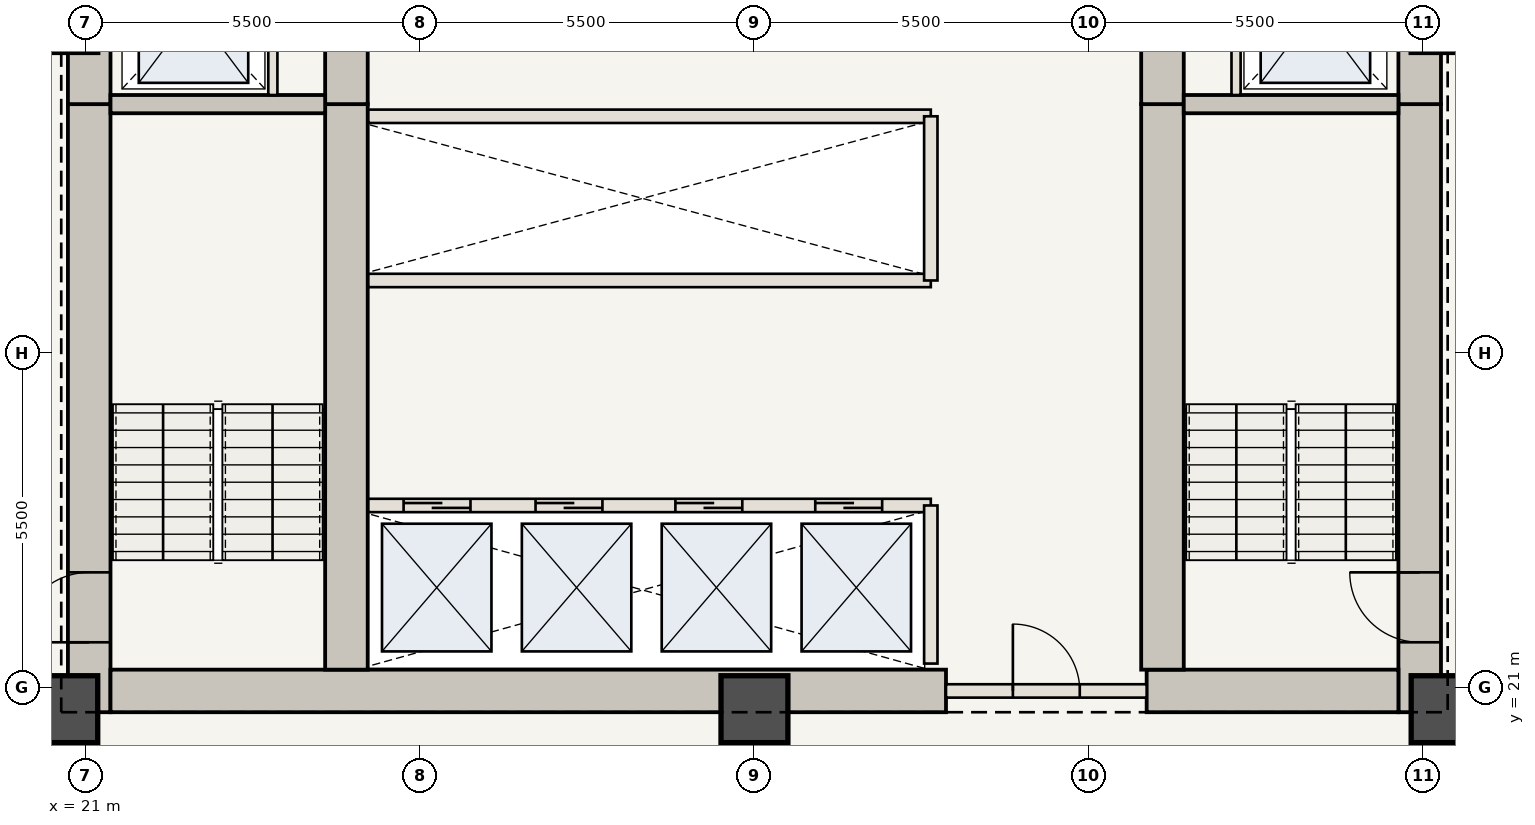
"""IFC4 building model, lengths in metres.
Left out: names, types, materials, properties, quantities, classifications, styles, units other than length and angle.
Written with IfcOpenShell. Run it as: python <this file> out.ifc"""

import sys

from ifc_helpers import new_model, si_unit, direction, frame, frame_2d, origin, origin_2d, place, context, subcontext, project, spatial, rectangle, extrude, element, fill, save


model = new_model("IFC4")
c1 = context("Model", 3, precision=1e-05, world=origin(), true_north=direction((0.0, 1.0)))
c2 = subcontext(c1, "Body", "Model", "MODEL_VIEW")
j1 = project(units=[si_unit("LENGTHUNIT", "METRE"), si_unit("PLANEANGLEUNIT", "RADIAN")], contexts=[c1])
p1 = place(None, origin())
s1 = spatial("IfcSite", under=j1, at=p1, CompositionType="ELEMENT")
p2 = place(p1, origin())
s2 = spatial("IfcBuilding", under=s1, at=p2, CompositionType="ELEMENT")
p3 = place(p2, frame((0.0, 0.0, 52.85)))
s3 = spatial("IfcBuildingStorey", under=s2, at=p3, CompositionType="ELEMENT", Elevation=52.85)
p4 = place(p3, frame((21.06, 20.6, 0.0), z_axis=(0.0, 0.0, 1.0), x_axis=(0.0, 1.0, 0.0)))
e1 = element("IfcWall", 1, at=p4, inside=s3, PredefinedType="SHEAR", context=c2, shape_type="SweptSolid", body=[
    extrude(rectangle(XDim=10.0, YDim=0.7, at=frame_2d((5.0, 0.0))), origin(), (0.0, 0.0, 1.0), 3.5),
])
p5 = place(p4, frame((1.15, 0.0, 0.0)))
e2 = element("IfcOpeningElement", 2, at=p5, cuts=e1, PredefinedType="OPENING", context=c2, shape_type="SweptSolid", body=[
    extrude(rectangle(XDim=1.15, YDim=2.15, at=frame_2d((0.575, 1.075))), frame((0.0, 0.36, 0.0), z_axis=(0.0, -1.0, 0.0), x_axis=(1.0, 0.0, 0.0)), (0.0, 0.0, 1.0), 0.72),
])
p6 = place(p3, frame((21.06, 30.6, 0.0), z_axis=(0.0, 0.0, 1.0), x_axis=(0.0, 1.0, 0.0)))
e3 = element("IfcWall", 3, at=p6, inside=s3, PredefinedType="SHEAR", context=c2, shape_type="SweptSolid", body=[
    extrude(rectangle(XDim=12.75, YDim=0.7, at=frame_2d((6.375, 0.0))), origin(), (0.0, 0.0, 1.0), 3.5),
])
p7 = place(p6, frame((4.2, 0.0, 0.0)))
e4 = element("IfcOpeningElement", 4, at=p7, cuts=e3, PredefinedType="OPENING", context=c2, shape_type="SweptSolid", body=[
    extrude(rectangle(XDim=1.1, YDim=2.15, at=frame_2d((0.55, 1.075))), frame((0.0, 0.36, 0.0), z_axis=(0.0, -1.0, 0.0), x_axis=(1.0, 0.0, 0.0)), (0.0, 0.0, 1.0), 0.72),
])
p8 = place(p6, frame((9.2, 0.0, 0.0)))
e5 = element("IfcOpeningElement", 5, at=p8, cuts=e3, PredefinedType="OPENING", context=c2, shape_type="SweptSolid", body=[
    extrude(rectangle(XDim=0.92, YDim=2.1, at=frame_2d((0.46, 1.05))), frame((0.0, 0.36, 0.0), z_axis=(0.0, -1.0, 0.0), x_axis=(1.0, 0.0, 0.0)), (0.0, 0.0, 1.0), 0.72),
])
p9 = place(p3, frame((42.94, 20.6, 0.0), z_axis=(0.0, 0.0, 1.0), x_axis=(0.0, 1.0, 0.0)))
e6 = element("IfcWall", 6, at=p9, inside=s3, PredefinedType="SHEAR", context=c2, shape_type="SweptSolid", body=[
    extrude(rectangle(XDim=10.0, YDim=0.7, at=frame_2d((5.0, 0.0))), origin(), (0.0, 0.0, 1.0), 3.5),
])
p10 = place(p9, frame((1.15, 0.0, 0.0)))
e7 = element("IfcOpeningElement", 7, at=p10, cuts=e6, PredefinedType="OPENING", context=c2, shape_type="SweptSolid", body=[
    extrude(rectangle(XDim=1.15, YDim=2.15, at=frame_2d((0.575, 1.075))), frame((0.0, 0.36, 0.0), z_axis=(0.0, -1.0, 0.0), x_axis=(1.0, 0.0, 0.0)), (0.0, 0.0, 1.0), 0.72),
])
p11 = place(p3, frame((42.94, 30.6, 0.0), z_axis=(0.0, 0.0, 1.0), x_axis=(0.0, 1.0, 0.0)))
e8 = element("IfcWall", 8, at=p11, inside=s3, PredefinedType="SHEAR", context=c2, shape_type="SweptSolid", body=[
    extrude(rectangle(XDim=12.75, YDim=0.7, at=frame_2d((6.375, 0.0))), origin(), (0.0, 0.0, 1.0), 3.5),
])
p12 = place(p11, frame((4.2, 0.0, 0.0)))
e9 = element("IfcOpeningElement", 9, at=p12, cuts=e8, PredefinedType="OPENING", context=c2, shape_type="SweptSolid", body=[
    extrude(rectangle(XDim=1.1, YDim=2.15, at=frame_2d((0.55, 1.075))), frame((0.0, 0.36, 0.0), z_axis=(0.0, -1.0, 0.0), x_axis=(1.0, 0.0, 0.0)), (0.0, 0.0, 1.0), 0.72),
])
p13 = place(p11, frame((8.05, 0.0, 0.0)))
e10 = element("IfcOpeningElement", 10, at=p13, cuts=e8, PredefinedType="OPENING", context=c2, shape_type="SweptSolid", body=[
    extrude(rectangle(XDim=0.88, YDim=2.1, at=frame_2d((0.44, 1.05))), frame((0.0, 0.36, 0.0), z_axis=(0.0, -1.0, 0.0), x_axis=(1.0, 0.0, 0.0)), (0.0, 0.0, 1.0), 0.72),
])
p14 = place(p11, frame((9.45, 0.0, 0.0)))
e11 = element("IfcOpeningElement", 11, at=p14, cuts=e8, PredefinedType="OPENING", context=c2, shape_type="SweptSolid", body=[
    extrude(rectangle(XDim=0.88, YDim=2.1, at=frame_2d((0.44, 1.05))), frame((0.0, 0.36, 0.0), z_axis=(0.0, -1.0, 0.0), x_axis=(1.0, 0.0, 0.0)), (0.0, 0.0, 1.0), 0.72),
])
p15 = place(p11, frame((10.85, 0.0, 0.0)))
e12 = element("IfcOpeningElement", 12, at=p15, cuts=e8, PredefinedType="OPENING", context=c2, shape_type="SweptSolid", body=[
    extrude(rectangle(XDim=0.88, YDim=2.1, at=frame_2d((0.44, 1.05))), frame((0.0, 0.36, 0.0), z_axis=(0.0, -1.0, 0.0), x_axis=(1.0, 0.0, 0.0)), (0.0, 0.0, 1.0), 0.72),
])
p16 = place(p3, frame((21.41, 20.95, 0.0), z_axis=(0.0, 0.0, 1.0), x_axis=(1.0, 0.0, 0.0)))
e13 = element("IfcWall", 13, at=p16, inside=s3, PredefinedType="SHEAR", context=c2, shape_type="SweptSolid", body=[
    extrude(rectangle(XDim=13.74, YDim=0.7, at=frame_2d((6.87, 0.0))), origin(), (0.0, 0.0, 1.0), 3.5),
])
p17 = place(p3, frame((38.45, 20.95, 0.0), z_axis=(0.0, 0.0, 1.0), x_axis=(1.0, 0.0, 0.0)))
e14 = element("IfcWall", 14, at=p17, inside=s3, PredefinedType="SHEAR", context=c2, shape_type="SweptSolid", body=[
    extrude(rectangle(XDim=4.14, YDim=0.7, at=frame_2d((2.07, 0.0))), origin(), (0.0, 0.0, 1.0), 3.5),
])
p18 = place(p3, frame((25.29, 21.3, 0.0), z_axis=(0.0, 0.0, 1.0), x_axis=(0.0, 1.0, 0.0)))
e15 = element("IfcWall", 15, at=p18, inside=s3, PredefinedType="SHEAR", context=c2, shape_type="SweptSolid", body=[
    extrude(rectangle(XDim=9.3, YDim=0.7, at=frame_2d((4.65, 0.0))), origin(), (0.0, 0.0, 1.0), 3.5),
])
p19 = place(p3, frame((25.29, 30.6, 0.0), z_axis=(0.0, 0.0, 1.0), x_axis=(0.0, 1.0, 0.0)))
e16 = element("IfcWall", 16, at=p19, inside=s3, PredefinedType="SHEAR", context=c2, shape_type="SweptSolid", body=[
    extrude(rectangle(XDim=12.05, YDim=0.7, at=frame_2d((6.025, 0.0))), origin(), (0.0, 0.0, 1.0), 3.5),
])
p20 = place(p19, frame((6.25, 0.0, 0.0)))
e17 = element("IfcOpeningElement", 17, at=p20, cuts=e16, PredefinedType="OPENING", context=c2, shape_type="SweptSolid", body=[
    extrude(rectangle(XDim=1.1, YDim=2.15, at=frame_2d((0.55, 1.075))), frame((0.0, 0.36, 0.0), z_axis=(0.0, -1.0, 0.0), x_axis=(1.0, 0.0, 0.0)), (0.0, 0.0, 1.0), 0.72),
])
p21 = place(p3, frame((38.71, 21.3, 0.0), z_axis=(0.0, 0.0, 1.0), x_axis=(0.0, 1.0, 0.0)))
e18 = element("IfcWall", 18, at=p21, inside=s3, PredefinedType="SHEAR", context=c2, shape_type="SweptSolid", body=[
    extrude(rectangle(XDim=9.3, YDim=0.7, at=frame_2d((4.65, 0.0))), origin(), (0.0, 0.0, 1.0), 3.5),
])
p22 = place(p3, frame((38.71, 30.6, 0.0), z_axis=(0.0, 0.0, 1.0), x_axis=(0.0, 1.0, 0.0)))
e19 = element("IfcWall", 19, at=p22, inside=s3, PredefinedType="SHEAR", context=c2, shape_type="SweptSolid", body=[
    extrude(rectangle(XDim=12.05, YDim=0.7, at=frame_2d((6.025, 0.0))), origin(), (0.0, 0.0, 1.0), 3.5),
])
for number, where, z_axis, x_axis in (
    (20, (20.65, 20.65, 0.0), (0.0, 0.0, 1.0), (1.0, 0.0, 0.0)),
    (21, (32.0, 20.65, 0.0), (0.0, 0.0, 1.0), (1.0, 0.0, 0.0)),
    (22, (43.35, 20.65, 0.0), (0.0, 0.0, 1.0), (1.0, 0.0, 0.0)),
):
    element("IfcColumn", number, at=place(p3, frame(where, z_axis=z_axis, x_axis=x_axis)), inside=s3, PredefinedType="COLUMN", context=c2, shape_type="SweptSolid", body=[
        extrude(rectangle(XDim=1.1, YDim=1.1, at=origin_2d()), origin(), (0.0, 0.0, 1.0), 3.5),
    ])
for number, where, z_axis, x_axis in (
    (23, (21.41, 30.6, 0.0), (0.0, 0.0, 1.0), (1.0, 0.0, 0.0)),
    (24, (39.06, 30.6, 0.0), (0.0, 0.0, 1.0), (1.0, 0.0, 0.0)),
):
    element("IfcWall", number, at=place(p3, frame(where, z_axis=z_axis, x_axis=x_axis)), inside=s3, PredefinedType="SHEAR", context=c2, shape_type="SweptSolid", body=[
        extrude(rectangle(XDim=3.53, YDim=0.3, at=frame_2d((1.765, 0.0))), origin(), (0.0, 0.0, 1.0), 3.32),
    ])
for number, where, z_axis, x_axis in (
    (25, (24.08, 30.75, 0.0), (0.0, 0.0, 1.0), (0.0, 1.0, 0.0)),
    (26, (39.92, 30.75, 0.0), (0.0, 0.0, 1.0), (0.0, 1.0, 0.0)),
):
    element("IfcWall", number, at=place(p3, frame(where, z_axis=z_axis, x_axis=x_axis)), inside=s3, PredefinedType="STANDARD", context=c2, shape_type="SweptSolid", body=[
        extrude(rectangle(XDim=2.65, YDim=0.15, at=frame_2d((1.325, 0.0))), origin(), (0.0, 0.0, 1.0), 3.32),
    ])
p23 = place(p3, frame((35.15, 20.95, 0.0), z_axis=(0.0, 0.0, 1.0), x_axis=(1.0, 0.0, 0.0)))
e27 = element("IfcWall", 27, at=p23, inside=s3, PredefinedType="STANDARD", context=c2, shape_type="SweptSolid", body=[
    extrude(rectangle(XDim=3.3, YDim=0.22, at=frame_2d((1.65, 0.0))), origin(), (0.0, 0.0, 1.0), 3.32),
])
p24 = place(p23, frame((1.1, 0.0, 0.0)))
e28 = element("IfcOpeningElement", 28, at=p24, cuts=e27, PredefinedType="OPENING", context=c2, shape_type="SweptSolid", body=[
    extrude(rectangle(XDim=1.1, YDim=2.15, at=frame_2d((0.55, 1.075))), frame((0.0, 0.12, 0.0), z_axis=(0.0, -1.0, 0.0), x_axis=(1.0, 0.0, 0.0)), (0.0, 0.0, 1.0), 0.24),
])
p25 = place(p3, frame((25.65, 24.0, 0.0), z_axis=(0.0, 0.0, 1.0), x_axis=(1.0, 0.0, 0.0)))
e29 = element("IfcWall", 29, at=p25, inside=s3, PredefinedType="STANDARD", context=c2, shape_type="SweptSolid", body=[
    extrude(rectangle(XDim=9.25, YDim=0.22, at=frame_2d((4.625, 0.0))), origin(), (0.0, 0.0, 1.0), 3.32),
])
p26 = place(p25, frame((0.58, 0.0, 0.0)))
e30 = element("IfcOpeningElement", 30, at=p26, cuts=e29, PredefinedType="OPENING", context=c2, shape_type="SweptSolid", body=[
    extrude(rectangle(XDim=1.1, YDim=2.15, at=frame_2d((0.55, 1.075))), frame((0.0, 0.12, 0.0), z_axis=(0.0, -1.0, 0.0), x_axis=(1.0, 0.0, 0.0)), (0.0, 0.0, 1.0), 0.24),
])
p27 = place(p25, frame((2.75, 0.0, 0.0)))
e31 = element("IfcOpeningElement", 31, at=p27, cuts=e29, PredefinedType="OPENING", context=c2, shape_type="SweptSolid", body=[
    extrude(rectangle(XDim=1.1, YDim=2.15, at=frame_2d((0.55, 1.075))), frame((0.0, 0.12, 0.0), z_axis=(0.0, -1.0, 0.0), x_axis=(1.0, 0.0, 0.0)), (0.0, 0.0, 1.0), 0.24),
])
p28 = place(p25, frame((5.05, 0.0, 0.0)))
e32 = element("IfcOpeningElement", 32, at=p28, cuts=e29, PredefinedType="OPENING", context=c2, shape_type="SweptSolid", body=[
    extrude(rectangle(XDim=1.1, YDim=2.15, at=frame_2d((0.55, 1.075))), frame((0.0, 0.12, 0.0), z_axis=(0.0, -1.0, 0.0), x_axis=(1.0, 0.0, 0.0)), (0.0, 0.0, 1.0), 0.24),
])
p29 = place(p25, frame((7.35, 0.0, 0.0)))
e33 = element("IfcOpeningElement", 33, at=p29, cuts=e29, PredefinedType="OPENING", context=c2, shape_type="SweptSolid", body=[
    extrude(rectangle(XDim=1.1, YDim=2.15, at=frame_2d((0.55, 1.075))), frame((0.0, 0.12, 0.0), z_axis=(0.0, -1.0, 0.0), x_axis=(1.0, 0.0, 0.0)), (0.0, 0.0, 1.0), 0.24),
])
p30 = place(p3, frame((34.9, 21.4, 0.0), z_axis=(0.0, 0.0, 1.0), x_axis=(0.0, 1.0, 0.0)))
e34 = element("IfcWall", 34, at=p30, inside=s3, PredefinedType="STANDARD", context=c2, shape_type="SweptSolid", body=[
    extrude(rectangle(XDim=2.6, YDim=0.22, at=frame_2d((1.3, 0.0))), origin(), (0.0, 0.0, 1.0), 3.32),
])
for number, where, z_axis, x_axis in (
    (35, (25.65, 27.7, 0.0), (0.0, 0.0, 1.0), (1.0, 0.0, 0.0)),
    (36, (25.65, 30.4, 0.0), (0.0, 0.0, 1.0), (1.0, 0.0, 0.0)),
):
    element("IfcWall", number, at=place(p3, frame(where, z_axis=z_axis, x_axis=x_axis)), inside=s3, PredefinedType="STANDARD", context=c2, shape_type="SweptSolid", body=[
        extrude(rectangle(XDim=9.25, YDim=0.22, at=frame_2d((4.625, 0.0))), origin(), (0.0, 0.0, 1.0), 3.32),
    ])
p31 = place(p3, frame((34.9, 27.7, 0.0), z_axis=(0.0, 0.0, 1.0), x_axis=(0.0, 1.0, 0.0)))
e37 = element("IfcWall", 37, at=p31, inside=s3, PredefinedType="STANDARD", context=c2, shape_type="SweptSolid", body=[
    extrude(rectangle(XDim=2.7, YDim=0.22, at=frame_2d((1.35, 0.0))), origin(), (0.0, 0.0, 1.0), 3.32),
])
p32 = place(p5, origin())
e38 = element("IfcDoor", 38, at=p32, inside=s3, OperationType="SINGLE_SWING_LEFT", PredefinedType="DOOR", context=c2, shape_type="SweptSolid", body=[
    extrude(rectangle(XDim=1.15, YDim=2.15, at=frame_2d((0.575, 1.075))), frame((0.0, 0.025, 0.0), z_axis=(0.0, -1.0, 0.0), x_axis=(1.0, 0.0, 0.0)), (0.0, 0.0, 1.0), 0.05),
])
fill(e2, e38)
p33 = place(p10, origin())
e39 = element("IfcDoor", 39, at=p33, inside=s3, OperationType="SINGLE_SWING_RIGHT", PredefinedType="DOOR", context=c2, shape_type="SweptSolid", body=[
    extrude(rectangle(XDim=1.15, YDim=2.15, at=frame_2d((0.575, 1.075))), frame((0.0, 0.025, 0.0), z_axis=(0.0, -1.0, 0.0), x_axis=(1.0, 0.0, 0.0)), (0.0, 0.0, 1.0), 0.05),
])
fill(e7, e39)
p34 = place(p24, origin())
e40 = element("IfcDoor", 40, at=p34, inside=s3, OperationType="SINGLE_SWING_LEFT", PredefinedType="DOOR", context=c2, shape_type="SweptSolid", body=[
    extrude(rectangle(XDim=1.1, YDim=2.15, at=frame_2d((0.55, 1.075))), frame((0.0, 0.025, 0.0), z_axis=(0.0, -1.0, 0.0), x_axis=(1.0, 0.0, 0.0)), (0.0, 0.0, 1.0), 0.05),
])
fill(e28, e40)
p35 = place(p26, origin())
e41 = element("IfcDoor", 41, at=p35, inside=s3, OperationType="DOUBLE_DOOR_SLIDING", PredefinedType="DOOR", context=c2, shape_type="SweptSolid", body=[
    extrude(rectangle(XDim=1.1, YDim=2.15, at=frame_2d((0.55, 1.075))), frame((0.0, 0.025, 0.0), z_axis=(0.0, -1.0, 0.0), x_axis=(1.0, 0.0, 0.0)), (0.0, 0.0, 1.0), 0.05),
])
fill(e30, e41)
p36 = place(p27, origin())
e42 = element("IfcDoor", 42, at=p36, inside=s3, OperationType="DOUBLE_DOOR_SLIDING", PredefinedType="DOOR", context=c2, shape_type="SweptSolid", body=[
    extrude(rectangle(XDim=1.1, YDim=2.15, at=frame_2d((0.55, 1.075))), frame((0.0, 0.025, 0.0), z_axis=(0.0, -1.0, 0.0), x_axis=(1.0, 0.0, 0.0)), (0.0, 0.0, 1.0), 0.05),
])
fill(e31, e42)
p37 = place(p28, origin())
e43 = element("IfcDoor", 43, at=p37, inside=s3, OperationType="DOUBLE_DOOR_SLIDING", PredefinedType="DOOR", context=c2, shape_type="SweptSolid", body=[
    extrude(rectangle(XDim=1.1, YDim=2.15, at=frame_2d((0.55, 1.075))), frame((0.0, 0.025, 0.0), z_axis=(0.0, -1.0, 0.0), x_axis=(1.0, 0.0, 0.0)), (0.0, 0.0, 1.0), 0.05),
])
fill(e32, e43)
p38 = place(p29, origin())
e44 = element("IfcDoor", 44, at=p38, inside=s3, OperationType="DOUBLE_DOOR_SLIDING", PredefinedType="DOOR", context=c2, shape_type="SweptSolid", body=[
    extrude(rectangle(XDim=1.1, YDim=2.15, at=frame_2d((0.55, 1.075))), frame((0.0, 0.025, 0.0), z_axis=(0.0, -1.0, 0.0), x_axis=(1.0, 0.0, 0.0)), (0.0, 0.0, 1.0), 0.05),
])
fill(e33, e44)
save(model, sys.argv[1])
